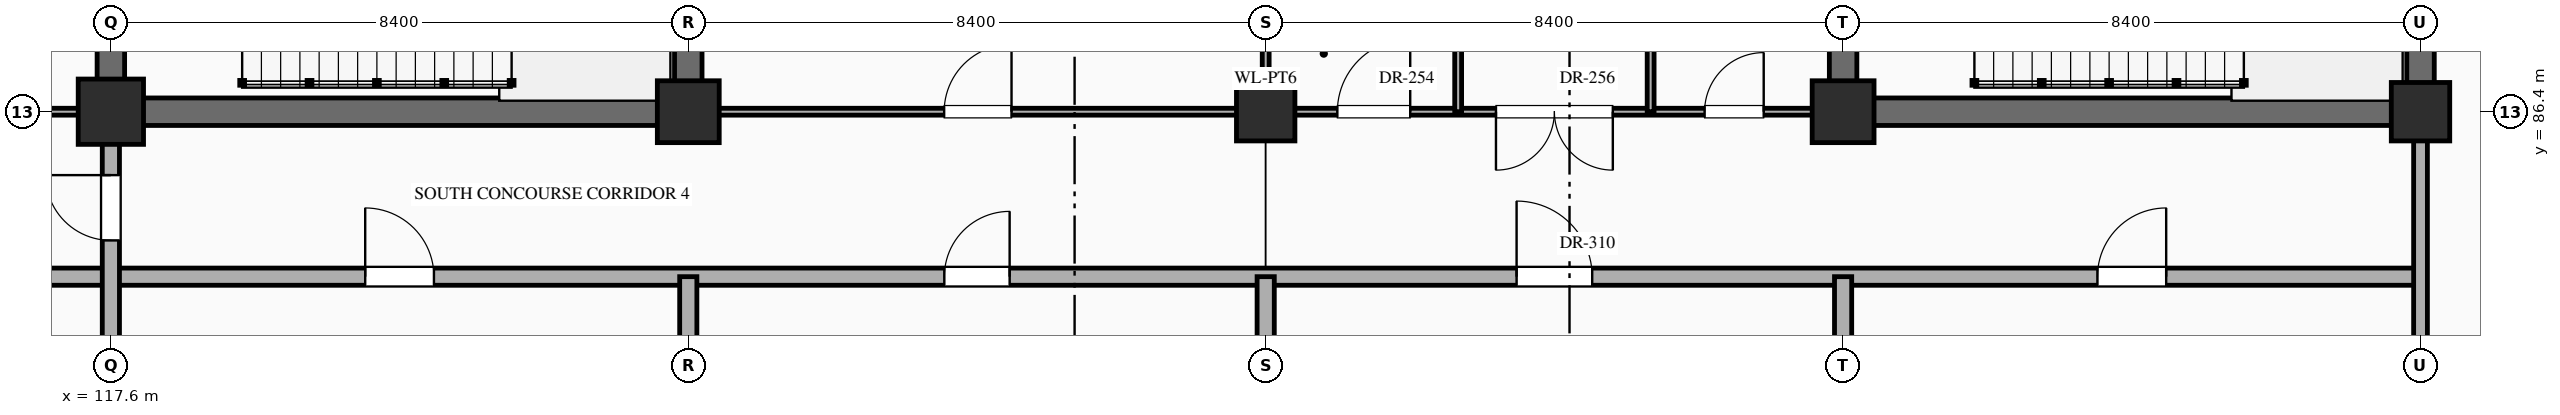
"""IFC4 building model, lengths in metres.
Left out: names, types, materials, properties, quantities, classifications, styles, units other than length and angle.
Written with IfcOpenShell. Run it as: python <this file> out.ifc"""

import sys

from ifc_helpers import new_model, si_unit, direction, frame, frame_2d, origin, origin_2d, place, context, subcontext, project, spatial, rectangle, extrude, element, fill, save


model = new_model("IFC4")
c1 = context("Model", 3, precision=1e-05, world=origin(), true_north=direction((0.0, 1.0)))
c2 = subcontext(c1, "Body", "Model", "MODEL_VIEW")
j1 = project(units=[si_unit("LENGTHUNIT", "METRE"), si_unit("PLANEANGLEUNIT", "RADIAN")], contexts=[c1])
p1 = place(None, origin())
s1 = spatial("IfcSite", under=j1, at=p1, CompositionType="ELEMENT")
p2 = place(p1, origin())
s2 = spatial("IfcBuilding", under=s1, at=p2, CompositionType="ELEMENT")
p3 = place(p2, frame((0.0, 0.0, -10.2)))
s3 = spatial("IfcBuildingStorey", under=s2, at=p3, CompositionType="ELEMENT", Elevation=-10.2)
p4 = place(p3, frame((117.6, 86.4, 0.0), z_axis=(0.0, 0.0, 1.0), x_axis=(1.0, 0.0, 0.0)))
e1 = element("IfcColumn", 1, at=p4, inside=s3, PredefinedType="COLUMN", context=c2, shape_type="SweptSolid", body=[
    extrude(rectangle(XDim=0.95, YDim=0.95, at=origin_2d()), origin(), (0.0, 0.0, 1.0), 4.8),
])
p5 = place(p3, frame((126.0, 86.4, 0.0), z_axis=(0.0, 0.0, 1.0), x_axis=(1.0, 0.0, 0.0)))
e2 = element("IfcColumn", 2, at=p5, inside=s3, PredefinedType="COLUMN", context=c2, shape_type="SweptSolid", body=[
    extrude(rectangle(XDim=0.9, YDim=0.9, at=origin_2d()), origin(), (0.0, 0.0, 1.0), 4.8),
])
p6 = place(p3, frame((134.4, 86.4, 0.0), z_axis=(0.0, 0.0, 1.0), x_axis=(1.0, 0.0, 0.0)))
e3 = element("IfcColumn", 3, at=p6, inside=s3, PredefinedType="COLUMN", context=c2, shape_type="SweptSolid", body=[
    extrude(rectangle(XDim=0.85, YDim=0.85, at=origin_2d()), origin(), (0.0, 0.0, 1.0), 4.8),
])
p7 = place(p3, frame((142.8, 86.4, 0.0), z_axis=(0.0, 0.0, 1.0), x_axis=(1.0, 0.0, 0.0)))
e4 = element("IfcColumn", 4, at=p7, inside=s3, PredefinedType="COLUMN", context=c2, shape_type="SweptSolid", body=[
    extrude(rectangle(XDim=0.9, YDim=0.9, at=origin_2d()), origin(), (0.0, 0.0, 1.0), 4.8),
])
p8 = place(p3, frame((151.2, 86.4, 0.0), z_axis=(0.0, 0.0, 1.0), x_axis=(1.0, 0.0, 0.0)))
e5 = element("IfcColumn", 5, at=p8, inside=s3, PredefinedType="COLUMN", context=c2, shape_type="SweptSolid", body=[
    extrude(rectangle(XDim=0.85, YDim=0.85, at=origin_2d()), origin(), (0.0, 0.0, 1.0), 4.8),
])
p9 = place(p3, frame((81.2, 84.0, 0.0), z_axis=(0.0, 0.0, 1.0), x_axis=(1.0, 0.0, 0.0)))
e6 = element("IfcWall", 6, at=p9, inside=s3, PredefinedType="STANDARD", context=c2, shape_type="SweptSolid", body=[
    extrude(rectangle(XDim=70.0, YDim=0.25, at=frame_2d((35.0, 0.0))), origin(), (0.0, 0.0, 1.0), 4.48),
])
p10 = place(p9, frame((0.9, 0.0, 0.0)))
e7 = element("IfcOpeningElement", 7, at=p10, cuts=e6, PredefinedType="OPENING", context=c2, shape_type="SweptSolid", body=[
    extrude(rectangle(XDim=1.0, YDim=2.2, at=frame_2d((0.5, 1.1))), frame((0.0, 0.137, 0.0), z_axis=(0.0, -1.0, 0.0), x_axis=(1.0, 0.0, 0.0)), (0.0, 0.0, 1.0), 0.274),
])
p11 = place(p9, frame((6.45, 0.0, 0.0)))
e8 = element("IfcOpeningElement", 8, at=p11, cuts=e6, PredefinedType="OPENING", context=c2, shape_type="SweptSolid", body=[
    extrude(rectangle(XDim=1.1, YDim=2.2, at=frame_2d((0.55, 1.1))), frame((0.0, 0.137, 0.0), z_axis=(0.0, -1.0, 0.0), x_axis=(1.0, 0.0, 0.0)), (0.0, 0.0, 1.0), 0.274),
])
p12 = place(p9, frame((14.9, 0.0, 0.0)))
e9 = element("IfcOpeningElement", 9, at=p12, cuts=e6, PredefinedType="OPENING", context=c2, shape_type="SweptSolid", body=[
    extrude(rectangle(XDim=1.0, YDim=2.2, at=frame_2d((0.5, 1.1))), frame((0.0, 0.137, 0.0), z_axis=(0.0, -1.0, 0.0), x_axis=(1.0, 0.0, 0.0)), (0.0, 0.0, 1.0), 0.274),
])
p13 = place(p9, frame((23.325, 0.0, 0.0)))
e10 = element("IfcOpeningElement", 10, at=p13, cuts=e6, PredefinedType="OPENING", context=c2, shape_type="SweptSolid", body=[
    extrude(rectangle(XDim=0.95, YDim=2.15, at=frame_2d((0.475, 1.075))), frame((0.0, 0.137, 0.0), z_axis=(0.0, -1.0, 0.0), x_axis=(1.0, 0.0, 0.0)), (0.0, 0.0, 1.0), 0.274),
])
p14 = place(p9, frame((31.65, 0.0, 0.0)))
e11 = element("IfcOpeningElement", 11, at=p14, cuts=e6, PredefinedType="OPENING", context=c2, shape_type="SweptSolid", body=[
    extrude(rectangle(XDim=1.1, YDim=2.2, at=frame_2d((0.55, 1.1))), frame((0.0, 0.137, 0.0), z_axis=(0.0, -1.0, 0.0), x_axis=(1.0, 0.0, 0.0)), (0.0, 0.0, 1.0), 0.274),
])
p15 = place(p9, frame((40.1, 0.0, 0.0)))
e12 = element("IfcOpeningElement", 12, at=p15, cuts=e6, PredefinedType="OPENING", context=c2, shape_type="SweptSolid", body=[
    extrude(rectangle(XDim=1.0, YDim=2.2, at=frame_2d((0.5, 1.1))), frame((0.0, 0.137, 0.0), z_axis=(0.0, -1.0, 0.0), x_axis=(1.0, 0.0, 0.0)), (0.0, 0.0, 1.0), 0.274),
])
p16 = place(p9, frame((48.525, 0.0, 0.0)))
e13 = element("IfcOpeningElement", 13, at=p16, cuts=e6, PredefinedType="OPENING", context=c2, shape_type="SweptSolid", body=[
    extrude(rectangle(XDim=0.95, YDim=2.15, at=frame_2d((0.475, 1.075))), frame((0.0, 0.137, 0.0), z_axis=(0.0, -1.0, 0.0), x_axis=(1.0, 0.0, 0.0)), (0.0, 0.0, 1.0), 0.274),
])
p17 = place(p9, frame((56.85, 0.0, 0.0)))
e14 = element("IfcOpeningElement", 14, at=p17, cuts=e6, PredefinedType="OPENING", context=c2, shape_type="SweptSolid", body=[
    extrude(rectangle(XDim=1.1, YDim=2.2, at=frame_2d((0.55, 1.1))), frame((0.0, 0.137, 0.0), z_axis=(0.0, -1.0, 0.0), x_axis=(1.0, 0.0, 0.0)), (0.0, 0.0, 1.0), 0.274),
])
p18 = place(p9, frame((65.3, 0.0, 0.0)))
e15 = element("IfcOpeningElement", 15, at=p18, cuts=e6, PredefinedType="OPENING", context=c2, shape_type="SweptSolid", body=[
    extrude(rectangle(XDim=1.0, YDim=2.2, at=frame_2d((0.5, 1.1))), frame((0.0, 0.137, 0.0), z_axis=(0.0, -1.0, 0.0), x_axis=(1.0, 0.0, 0.0)), (0.0, 0.0, 1.0), 0.274),
])
p19 = place(p3, frame((109.2, 86.4, 0.0), z_axis=(0.0, 0.0, 1.0), x_axis=(1.0, 0.0, 0.0)))
e16 = element("IfcWall", 16, at=p19, inside=s3, PredefinedType="STANDARD", context=c2, shape_type="SweptSolid", body=[
    extrude(rectangle(XDim=8.4, YDim=0.1, at=frame_2d((4.2, 0.0))), origin(), (0.0, 0.0, 1.0), 3.63),
])
p20 = place(p19, frame((0.998, 0.0, 0.0)))
e17 = element("IfcOpeningElement", 17, at=p20, cuts=e16, PredefinedType="OPENING", context=c2, shape_type="SweptSolid", body=[
    extrude(rectangle(XDim=1.2, YDim=2.35, at=frame_2d((0.6, 1.175))), frame((0.0, 0.062, 0.0), z_axis=(0.0, -1.0, 0.0), x_axis=(1.0, 0.0, 0.0)), (0.0, 0.0, 1.0), 0.124),
])
p21 = place(p19, frame((3.56, 0.0, 0.0)))
e18 = element("IfcOpeningElement", 18, at=p21, cuts=e16, PredefinedType="OPENING", context=c2, shape_type="SweptSolid", body=[
    extrude(rectangle(XDim=1.28, YDim=2.35, at=frame_2d((0.64, 1.175))), frame((0.0, 0.062, 0.0), z_axis=(0.0, -1.0, 0.0), x_axis=(1.0, 0.0, 0.0)), (0.0, 0.0, 1.0), 0.124),
])
p22 = place(p19, frame((6.333, 0.0, 0.0)))
e19 = element("IfcOpeningElement", 19, at=p22, cuts=e16, PredefinedType="OPENING", context=c2, shape_type="SweptSolid", body=[
    extrude(rectangle(XDim=0.94, YDim=2.3, at=frame_2d((0.47, 1.15))), frame((0.0, 0.062, 0.0), z_axis=(0.0, -1.0, 0.0), x_axis=(1.0, 0.0, 0.0)), (0.0, 0.0, 1.0), 0.124),
])
p23 = place(p3, frame((117.6, 86.4, 0.0), z_axis=(0.0, 0.0, 1.0), x_axis=(1.0, 0.0, 0.0)))
e20 = element("IfcWall", 20, at=p23, inside=s3, PredefinedType="SHEAR", context=c2, shape_type="SweptSolid", body=[
    extrude(rectangle(XDim=8.4, YDim=0.4, at=frame_2d((4.2, 0.0))), origin(), (0.0, 0.0, 1.0), 4.48),
])
p24 = place(p3, frame((126.0, 86.4, 0.0), z_axis=(0.0, 0.0, 1.0), x_axis=(1.0, 0.0, 0.0)))
e21 = element("IfcWall", 21, at=p24, inside=s3, PredefinedType="STANDARD", context=c2, shape_type="SweptSolid", body=[
    extrude(rectangle(XDim=16.8, YDim=0.1, at=frame_2d((8.4, 0.0))), origin(), (0.0, 0.0, 1.0), 3.63),
])
p25 = place(p24, frame((3.722, 0.0, 0.0)))
e22 = element("IfcOpeningElement", 22, at=p25, cuts=e21, PredefinedType="OPENING", context=c2, shape_type="SweptSolid", body=[
    extrude(rectangle(XDim=0.98, YDim=2.35, at=frame_2d((0.49, 1.175))), frame((0.0, 0.062, 0.0), z_axis=(0.0, -1.0, 0.0), x_axis=(1.0, 0.0, 0.0)), (0.0, 0.0, 1.0), 0.124),
])
p26 = place(p24, frame((9.442, 0.0, 0.0)))
e23 = element("IfcOpeningElement", 23, at=p26, cuts=e21, PredefinedType="OPENING", context=c2, shape_type="SweptSolid", body=[
    extrude(rectangle(XDim=1.06, YDim=2.4, at=frame_2d((0.53, 1.2))), frame((0.0, 0.062, 0.0), z_axis=(0.0, -1.0, 0.0), x_axis=(1.0, 0.0, 0.0)), (0.0, 0.0, 1.0), 0.124),
])
p27 = place(p24, frame((11.75, 0.0, 0.0)))
e24 = element("IfcOpeningElement", 24, at=p27, cuts=e21, PredefinedType="OPENING", context=c2, shape_type="SweptSolid", body=[
    extrude(rectangle(XDim=1.7, YDim=2.45, at=frame_2d((0.85, 1.225))), frame((0.0, 0.062, 0.0), z_axis=(0.0, -1.0, 0.0), x_axis=(1.0, 0.0, 0.0)), (0.0, 0.0, 1.0), 0.124),
])
p28 = place(p24, frame((14.785, 0.0, 0.0)))
e25 = element("IfcOpeningElement", 25, at=p28, cuts=e21, PredefinedType="OPENING", context=c2, shape_type="SweptSolid", body=[
    extrude(rectangle(XDim=0.86, YDim=2.1, at=frame_2d((0.43, 1.05))), frame((0.0, 0.062, 0.0), z_axis=(0.0, -1.0, 0.0), x_axis=(1.0, 0.0, 0.0)), (0.0, 0.0, 1.0), 0.124),
])
p29 = place(p3, frame((142.8, 86.4, 0.0), z_axis=(0.0, 0.0, 1.0), x_axis=(1.0, 0.0, 0.0)))
e26 = element("IfcWall", 26, at=p29, inside=s3, PredefinedType="SHEAR", context=c2, shape_type="SweptSolid", body=[
    extrude(rectangle(XDim=8.4, YDim=0.4, at=frame_2d((4.2, 0.0))), origin(), (0.0, 0.0, 1.0), 4.48),
])
p30 = place(p3, frame((117.6, 43.2, 0.0), z_axis=(0.0, 0.0, 1.0), x_axis=(0.0, 1.0, 0.0)))
e27 = element("IfcWall", 27, at=p30, inside=s3, PredefinedType="STANDARD", context=c2, shape_type="SweptSolid", body=[
    extrude(rectangle(XDim=43.2, YDim=0.25, at=frame_2d((21.6, 0.0))), origin(), (0.0, 0.0, 1.0), 3.73),
])
p31 = place(p30, frame((41.327, 0.0, 0.0)))
e28 = element("IfcOpeningElement", 28, at=p31, cuts=e27, PredefinedType="OPENING", context=c2, shape_type="SweptSolid", body=[
    extrude(rectangle(XDim=0.95, YDim=2.15, at=frame_2d((0.475, 1.075))), frame((0.0, 0.137, 0.0), z_axis=(0.0, -1.0, 0.0), x_axis=(1.0, 0.0, 0.0)), (0.0, 0.0, 1.0), 0.274),
])
p32 = place(p3, frame((117.6, 86.4, 0.0), z_axis=(0.0, 0.0, 1.0), x_axis=(0.0, 1.0, 0.0)))
e29 = element("IfcWall", 29, at=p32, inside=s3, PredefinedType="SHEAR", context=c2, shape_type="SweptSolid", body=[
    extrude(rectangle(XDim=4.8, YDim=0.4, at=frame_2d((2.4, 0.0))), origin(), (0.0, 0.0, 1.0), 4.48),
])
p33 = place(p3, frame((126.0, 79.2, 0.0), z_axis=(0.0, 0.0, 1.0), x_axis=(0.0, 1.0, 0.0)))
e30 = element("IfcWall", 30, at=p33, inside=s3, PredefinedType="STANDARD", context=c2, shape_type="SweptSolid", body=[
    extrude(rectangle(XDim=4.8, YDim=0.25, at=frame_2d((2.4, 0.0))), origin(), (0.0, 0.0, 1.0), 3.73),
])
p34 = place(p3, frame((126.0, 86.4, 0.0), z_axis=(0.0, 0.0, 1.0), x_axis=(0.0, 1.0, 0.0)))
e31 = element("IfcWall", 31, at=p34, inside=s3, PredefinedType="SHEAR", context=c2, shape_type="SweptSolid", body=[
    extrude(rectangle(XDim=4.8, YDim=0.4, at=frame_2d((2.4, 0.0))), origin(), (0.0, 0.0, 1.0), 4.48),
])
p35 = place(p3, frame((134.4, 79.2, 0.0), z_axis=(0.0, 0.0, 1.0), x_axis=(0.0, 1.0, 0.0)))
e32 = element("IfcWall", 32, at=p35, inside=s3, PredefinedType="STANDARD", context=c2, shape_type="SweptSolid", body=[
    extrude(rectangle(XDim=4.8, YDim=0.25, at=frame_2d((2.4, 0.0))), origin(), (0.0, 0.0, 1.0), 3.73),
])
p36 = place(p3, frame((134.4, 86.4, 0.0), z_axis=(0.0, 0.0, 1.0), x_axis=(0.0, 1.0, 0.0)))
e33 = element("IfcWall", 33, at=p36, inside=s3, PredefinedType="STANDARD", context=c2, shape_type="SweptSolid", body=[
    extrude(rectangle(XDim=7.2, YDim=0.1, at=frame_2d((3.6, 0.0))), origin(), (0.0, 0.0, 1.0), 3.73),
])
p37 = place(p3, frame((137.2, 86.4, 0.0), z_axis=(0.0, 0.0, 1.0), x_axis=(0.0, 1.0, 0.0)))
e34 = element("IfcWall", 34, at=p37, inside=s3, PredefinedType="STANDARD", context=c2, shape_type="SweptSolid", body=[
    extrude(rectangle(XDim=7.2, YDim=0.1, at=frame_2d((3.6, 0.0))), origin(), (0.0, 0.0, 1.0), 4.48),
])
p38 = place(p37, frame((3.09, 0.0, 0.0)))
e35 = element("IfcOpeningElement", 35, at=p38, cuts=e34, PredefinedType="OPENING", context=c2, shape_type="SweptSolid", body=[
    extrude(rectangle(XDim=1.02, YDim=2.4, at=frame_2d((0.51, 1.2))), frame((0.0, 0.062, 0.0), z_axis=(0.0, -1.0, 0.0), x_axis=(1.0, 0.0, 0.0)), (0.0, 0.0, 1.0), 0.124),
])
p39 = place(p3, frame((140.0, 86.4, 0.0), z_axis=(0.0, 0.0, 1.0), x_axis=(0.0, 1.0, 0.0)))
e36 = element("IfcWall", 36, at=p39, inside=s3, PredefinedType="STANDARD", context=c2, shape_type="SweptSolid", body=[
    extrude(rectangle(XDim=7.2, YDim=0.1, at=frame_2d((3.6, 0.0))), origin(), (0.0, 0.0, 1.0), 4.48),
])
p40 = place(p39, frame((3.03, 0.0, 0.0)))
e37 = element("IfcOpeningElement", 37, at=p40, cuts=e36, PredefinedType="OPENING", context=c2, shape_type="SweptSolid", body=[
    extrude(rectangle(XDim=1.14, YDim=2.4, at=frame_2d((0.57, 1.2))), frame((0.0, 0.062, 0.0), z_axis=(0.0, -1.0, 0.0), x_axis=(1.0, 0.0, 0.0)), (0.0, 0.0, 1.0), 0.124),
])
p41 = place(p3, frame((142.8, 79.2, 0.0), z_axis=(0.0, 0.0, 1.0), x_axis=(0.0, 1.0, 0.0)))
e38 = element("IfcWall", 38, at=p41, inside=s3, PredefinedType="STANDARD", context=c2, shape_type="SweptSolid", body=[
    extrude(rectangle(XDim=4.8, YDim=0.25, at=frame_2d((2.4, 0.0))), origin(), (0.0, 0.0, 1.0), 3.73),
])
p42 = place(p3, frame((142.8, 86.4, 0.0), z_axis=(0.0, 0.0, 1.0), x_axis=(0.0, 1.0, 0.0)))
e39 = element("IfcWall", 39, at=p42, inside=s3, PredefinedType="SHEAR", context=c2, shape_type="SweptSolid", body=[
    extrude(rectangle(XDim=4.8, YDim=0.4, at=frame_2d((2.4, 0.0))), origin(), (0.0, 0.0, 1.0), 4.48),
])
p43 = place(p3, frame((151.2, 64.8, 0.0), z_axis=(0.0, 0.0, 1.0), x_axis=(0.0, 1.0, 0.0)))
e40 = element("IfcWall", 40, at=p43, inside=s3, PredefinedType="STANDARD", context=c2, shape_type="SweptSolid", body=[
    extrude(rectangle(XDim=21.6, YDim=0.2, at=frame_2d((10.8, 0.0))), origin(), (0.0, 0.0, 1.0), 3.73),
])
p44 = place(p3, frame((151.2, 86.4, 0.0), z_axis=(0.0, 0.0, 1.0), x_axis=(0.0, 1.0, 0.0)))
e41 = element("IfcWall", 41, at=p44, inside=s3, PredefinedType="SHEAR", context=c2, shape_type="SweptSolid", body=[
    extrude(rectangle(XDim=4.8, YDim=0.4, at=frame_2d((2.4, 0.0))), origin(), (0.0, 0.0, 1.0), 4.48),
])
p45 = place(p25, origin())
e42 = element("IfcDoor", 42, at=p45, inside=s3, OperationType="SINGLE_SWING_RIGHT", PredefinedType="DOOR", context=c2, shape_type="SweptSolid", body=[
    extrude(rectangle(XDim=0.98, YDim=2.35, at=frame_2d((0.49, 1.175))), frame((0.0, 0.025, 0.0), z_axis=(0.0, -1.0, 0.0), x_axis=(1.0, 0.0, 0.0)), (0.0, 0.0, 1.0), 0.05),
])
fill(e22, e42)
p46 = place(p26, origin())
e43 = element("IfcDoor", 43, at=p46, inside=s3, OperationType="SINGLE_SWING_RIGHT", PredefinedType="DOOR", context=c2, shape_type="SweptSolid", body=[
    extrude(rectangle(XDim=1.06, YDim=2.4, at=frame_2d((0.53, 1.2))), frame((0.0, 0.025, 0.0), z_axis=(0.0, -1.0, 0.0), x_axis=(1.0, 0.0, 0.0)), (0.0, 0.0, 1.0), 0.05),
])
fill(e23, e43)
p47 = place(p27, frame((1.7, 0.0, 0.0), z_axis=(0.0, 0.0, 1.0), x_axis=(-1.0, 0.0, 0.0)))
e44 = element("IfcDoor", 44, at=p47, inside=s3, OperationType="DOUBLE_DOOR_SINGLE_SWING", PredefinedType="DOOR", context=c2, shape_type="SweptSolid", body=[
    extrude(rectangle(XDim=1.7, YDim=2.45, at=frame_2d((0.85, 1.225))), frame((0.0, 0.025, 0.0), z_axis=(0.0, -1.0, 0.0), x_axis=(1.0, 0.0, 0.0)), (0.0, 0.0, 1.0), 0.05),
])
fill(e24, e44)
p48 = place(p28, origin())
e45 = element("IfcDoor", 45, at=p48, inside=s3, OperationType="SINGLE_SWING_RIGHT", PredefinedType="DOOR", context=c2, shape_type="SweptSolid", body=[
    extrude(rectangle(XDim=0.86, YDim=2.1, at=frame_2d((0.43, 1.05))), frame((0.0, 0.025, 0.0), z_axis=(0.0, -1.0, 0.0), x_axis=(1.0, 0.0, 0.0)), (0.0, 0.0, 1.0), 0.05),
])
fill(e25, e45)
p49 = place(p31, origin())
e46 = element("IfcDoor", 46, at=p49, inside=s3, OperationType="SINGLE_SWING_RIGHT", PredefinedType="DOOR", context=c2, shape_type="SweptSolid", body=[
    extrude(rectangle(XDim=0.95, YDim=2.15, at=frame_2d((0.475, 1.075))), frame((0.0, 0.025, 0.0), z_axis=(0.0, -1.0, 0.0), x_axis=(1.0, 0.0, 0.0)), (0.0, 0.0, 1.0), 0.05),
])
fill(e28, e46)
p50 = place(p15, origin())
e47 = element("IfcDoor", 47, at=p50, inside=s3, OperationType="SINGLE_SWING_LEFT", PredefinedType="DOOR", context=c2, shape_type="SweptSolid", body=[
    extrude(rectangle(XDim=1.0, YDim=2.2, at=frame_2d((0.5, 1.1))), frame((0.0, 0.025, 0.0), z_axis=(0.0, -1.0, 0.0), x_axis=(1.0, 0.0, 0.0)), (0.0, 0.0, 1.0), 0.05),
])
fill(e12, e47)
p51 = place(p16, origin())
e48 = element("IfcDoor", 48, at=p51, inside=s3, OperationType="SINGLE_SWING_RIGHT", PredefinedType="DOOR", context=c2, shape_type="SweptSolid", body=[
    extrude(rectangle(XDim=0.95, YDim=2.15, at=frame_2d((0.475, 1.075))), frame((0.0, 0.025, 0.0), z_axis=(0.0, -1.0, 0.0), x_axis=(1.0, 0.0, 0.0)), (0.0, 0.0, 1.0), 0.05),
])
fill(e13, e48)
p52 = place(p17, origin())
e49 = element("IfcDoor", 49, at=p52, inside=s3, OperationType="SINGLE_SWING_LEFT", PredefinedType="DOOR", context=c2, shape_type="SweptSolid", body=[
    extrude(rectangle(XDim=1.1, YDim=2.2, at=frame_2d((0.55, 1.1))), frame((0.0, 0.025, 0.0), z_axis=(0.0, -1.0, 0.0), x_axis=(1.0, 0.0, 0.0)), (0.0, 0.0, 1.0), 0.05),
])
fill(e14, e49)
p53 = place(p18, origin())
e50 = element("IfcDoor", 50, at=p53, inside=s3, OperationType="SINGLE_SWING_RIGHT", PredefinedType="DOOR", context=c2, shape_type="SweptSolid", body=[
    extrude(rectangle(XDim=1.0, YDim=2.2, at=frame_2d((0.5, 1.1))), frame((0.0, 0.025, 0.0), z_axis=(0.0, -1.0, 0.0), x_axis=(1.0, 0.0, 0.0)), (0.0, 0.0, 1.0), 0.05),
])
fill(e15, e50)
save(model, sys.argv[1])
